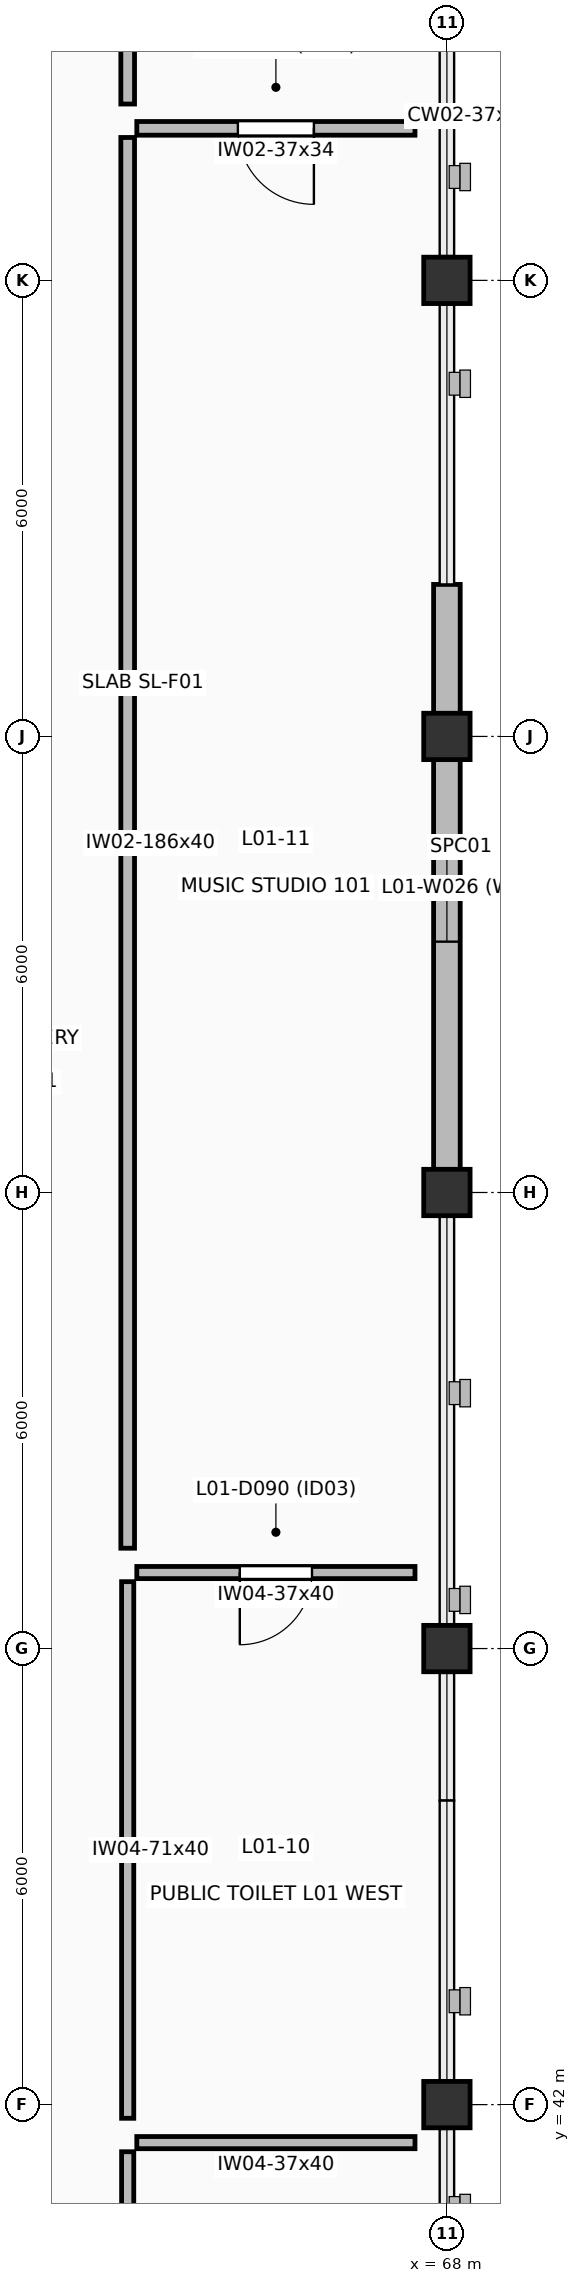
"""IFC4 building model, lengths in metres.
Left out: names, types, materials, properties, quantities, classifications, styles, units other than length and angle.
Written with IfcOpenShell. Run it as: python <this file> out.ifc"""

import sys

from ifc_helpers import new_model, si_unit, direction, frame, frame_2d, origin, origin_2d, place, context, subcontext, project, spatial, rectangle, extrude, element, fill, save


model = new_model("IFC4")
c1 = context("Model", 3, precision=1e-05, world=origin(), true_north=direction((0.0, 1.0)))
c2 = subcontext(c1, "Body", "Model", "MODEL_VIEW")
j1 = project(units=[si_unit("LENGTHUNIT", "METRE"), si_unit("PLANEANGLEUNIT", "RADIAN")], contexts=[c1])
p1 = place(None, origin())
s1 = spatial("IfcSite", under=j1, at=p1, CompositionType="ELEMENT")
p2 = place(p1, origin())
s2 = spatial("IfcBuilding", under=s1, at=p2, CompositionType="ELEMENT")
p3 = place(p2, frame((0.0, 0.0, 5.4)))
s3 = spatial("IfcBuildingStorey", under=s2, at=p3, CompositionType="ELEMENT", Elevation=5.4)
for number, where, z_axis, x_axis in (
    (1, (68.0, 42.0, 0.0), (0.0, 0.0, 1.0), (1.0, 0.0, 0.0)),
    (2, (68.0, 48.0, 0.0), (0.0, 0.0, 1.0), (1.0, 0.0, 0.0)),
    (3, (68.0, 54.0, 0.0), (0.0, 0.0, 1.0), (1.0, 0.0, 0.0)),
    (4, (68.0, 60.0, 0.0), (0.0, 0.0, 1.0), (1.0, 0.0, 0.0)),
    (5, (68.0, 66.0, 0.0), (0.0, 0.0, 1.0), (1.0, 0.0, 0.0)),
):
    element("IfcColumn", number, at=place(p3, frame(where, z_axis=z_axis, x_axis=x_axis)), inside=s3, PredefinedType="COLUMN", context=c2, shape_type="SweptSolid", body=[
        extrude(rectangle(XDim=0.61, YDim=0.61, at=origin_2d()), origin(), (0.0, 0.0, 1.0), 4.2),
    ])
p4 = place(p3, frame((68.0, 62.0, 0.0), z_axis=(0.0, 0.0, 1.0), x_axis=(0.0, -1.0, 0.0)))
e6 = element("IfcWall", 6, at=p4, inside=s3, PredefinedType="SOLIDWALL", context=c2, shape_type="SweptSolid", body=[
    extrude(rectangle(XDim=8.0, YDim=0.35, at=frame_2d((4.0, 0.0))), origin(), (0.0, 0.0, 1.0), 3.245),
])
p5 = place(p4, frame((3.3, 0.0, 0.95)))
e7 = element("IfcOpeningElement", 7, at=p5, cuts=e6, PredefinedType="OPENING", context=c2, shape_type="SweptSolid", body=[
    extrude(rectangle(XDim=1.4, YDim=1.8, at=frame_2d((0.7, 0.9))), frame((0.0, 0.185, 0.0), z_axis=(0.0, -1.0, 0.0), x_axis=(1.0, 0.0, 0.0)), (0.0, 0.0, 1.0), 0.37),
])
p6 = place(p3, frame((67.58, 41.5, 0.0), z_axis=(0.0, 0.0, 1.0), x_axis=(-1.0, 0.0, 0.0)))
e8 = element("IfcWall", 8, at=p6, inside=s3, PredefinedType="PLUMBINGWALL", context=c2, shape_type="SweptSolid", body=[
    extrude(rectangle(XDim=3.66, YDim=0.16, at=frame_2d((1.83, 0.0))), origin(), (0.0, 0.0, 1.0), 3.98),
])
p7 = place(p3, frame((63.8, 41.38, 0.0), z_axis=(0.0, 0.0, 1.0), x_axis=(0.0, -1.0, 0.0)))
e9 = element("IfcWall", 9, at=p7, inside=s3, PredefinedType="PLUMBINGWALL", context=c2, shape_type="SweptSolid", body=[
    extrude(rectangle(XDim=5.06, YDim=0.16, at=frame_2d((2.53, 0.0))), origin(), (0.0, 0.0, 1.0), 3.98),
])
p8 = place(p3, frame((67.58, 49.0, 0.0), z_axis=(0.0, 0.0, 1.0), x_axis=(-1.0, 0.0, 0.0)))
e10 = element("IfcWall", 10, at=p8, inside=s3, PredefinedType="PLUMBINGWALL", context=c2, shape_type="SweptSolid", body=[
    extrude(rectangle(XDim=3.66, YDim=0.16, at=frame_2d((1.83, 0.0))), origin(), (0.0, 0.0, 1.0), 3.98),
])
p9 = place(p8, frame((1.355, 0.0, 0.0)))
e11 = element("IfcOpeningElement", 11, at=p9, cuts=e10, PredefinedType="OPENING", context=c2, shape_type="SweptSolid", body=[
    extrude(rectangle(XDim=0.95, YDim=2.15, at=frame_2d((0.475, 1.075))), frame((0.0, 0.09, 0.0), z_axis=(0.0, -1.0, 0.0), x_axis=(1.0, 0.0, 0.0)), (0.0, 0.0, 1.0), 0.18),
])
p10 = place(p3, frame((63.8, 48.88, 0.0), z_axis=(0.0, 0.0, 1.0), x_axis=(0.0, -1.0, 0.0)))
e12 = element("IfcWall", 12, at=p10, inside=s3, PredefinedType="PLUMBINGWALL", context=c2, shape_type="SweptSolid", body=[
    extrude(rectangle(XDim=7.06, YDim=0.16, at=frame_2d((3.53, 0.0))), origin(), (0.0, 0.0, 1.0), 3.98),
])
p11 = place(p3, frame((67.58, 68.0, 0.0), z_axis=(0.0, 0.0, 1.0), x_axis=(-1.0, 0.0, 0.0)))
e13 = element("IfcWall", 13, at=p11, inside=s3, PredefinedType="PARTITIONING", context=c2, shape_type="SweptSolid", body=[
    extrude(rectangle(XDim=3.66, YDim=0.18, at=frame_2d((1.83, 0.0))), origin(), (0.0, 0.0, 1.0), 3.385),
])
p12 = place(p11, frame((1.33, 0.0, 0.0)))
e14 = element("IfcOpeningElement", 14, at=p12, cuts=e13, PredefinedType="OPENING", context=c2, shape_type="SweptSolid", body=[
    extrude(rectangle(XDim=1.0, YDim=2.15, at=frame_2d((0.5, 1.075))), frame((0.0, 0.1, 0.0), z_axis=(0.0, -1.0, 0.0), x_axis=(1.0, 0.0, 0.0)), (0.0, 0.0, 1.0), 0.2),
])
p13 = place(p3, frame((63.8, 67.88, 0.0), z_axis=(0.0, 0.0, 1.0), x_axis=(0.0, -1.0, 0.0)))
e15 = element("IfcWall", 15, at=p13, inside=s3, PredefinedType="PARTITIONING", context=c2, shape_type="SweptSolid", body=[
    extrude(rectangle(XDim=18.56, YDim=0.18, at=frame_2d((9.28, 0.0))), origin(), (0.0, 0.0, 1.0), 3.98),
])
p14 = place(p3, frame((63.8, 85.58, 0.0), z_axis=(0.0, 0.0, 1.0), x_axis=(0.0, -1.0, 0.0)))
e16 = element("IfcWall", 16, at=p14, inside=s3, PredefinedType="PARTITIONING", context=c2, shape_type="SweptSolid", body=[
    extrude(rectangle(XDim=17.26, YDim=0.18, at=frame_2d((8.63, 0.0))), origin(), (0.0, 0.0, 1.0), 3.98),
])
p15 = place(p14, frame((8.13, 0.0, 0.0)))
e17 = element("IfcOpeningElement", 17, at=p15, cuts=e16, PredefinedType="OPENING", context=c2, shape_type="SweptSolid", body=[
    extrude(rectangle(XDim=1.0, YDim=2.15, at=frame_2d((0.5, 1.075))), frame((0.0, 0.1, 0.0), z_axis=(0.0, -1.0, 0.0), x_axis=(1.0, 0.0, 0.0)), (0.0, 0.0, 1.0), 0.2),
])
p16 = place(p5, origin())
e18 = element("IfcWindow", 18, at=p16, inside=s3, PartitioningType="SINGLE_PANEL", PredefinedType="WINDOW", context=c2, shape_type="SweptSolid", body=[
    extrude(rectangle(XDim=1.4, YDim=1.8, at=frame_2d((0.7, 0.9))), frame((0.0, 0.03, 0.0), z_axis=(0.0, -1.0, 0.0), x_axis=(1.0, 0.0, 0.0)), (0.0, 0.0, 1.0), 0.06),
])
fill(e7, e18)
p17 = place(p9, origin())
e19 = element("IfcDoor", 19, at=p17, inside=s3, OperationType="SINGLE_SWING_RIGHT", PredefinedType="DOOR", context=c2, shape_type="SweptSolid", body=[
    extrude(rectangle(XDim=0.95, YDim=2.15, at=frame_2d((0.475, 1.075))), frame((0.0, 0.025, 0.0), z_axis=(0.0, -1.0, 0.0), x_axis=(1.0, 0.0, 0.0)), (0.0, 0.0, 1.0), 0.05),
])
fill(e11, e19)
p18 = place(p12, origin())
e20 = element("IfcDoor", 20, at=p18, inside=s3, OperationType="SINGLE_SWING_LEFT", PredefinedType="DOOR", context=c2, shape_type="SweptSolid", body=[
    extrude(rectangle(XDim=1.0, YDim=2.15, at=frame_2d((0.5, 1.075))), frame((0.0, 0.025, 0.0), z_axis=(0.0, -1.0, 0.0), x_axis=(1.0, 0.0, 0.0)), (0.0, 0.0, 1.0), 0.05),
])
fill(e14, e20)
save(model, sys.argv[1])
